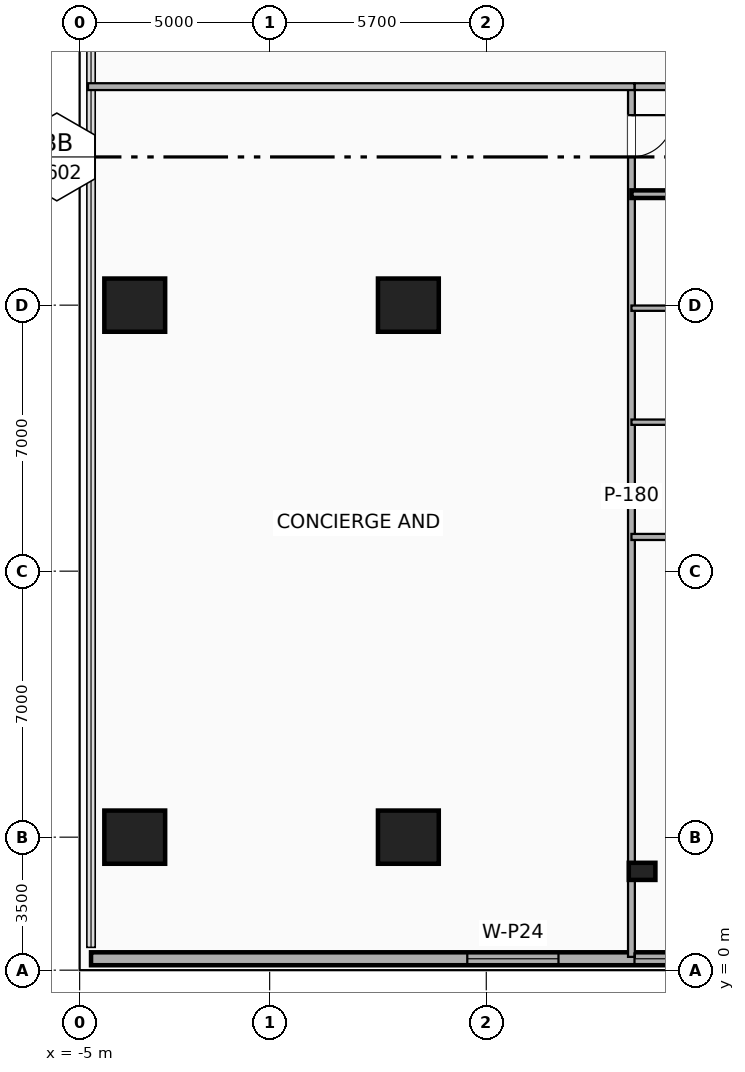
"""IFC4 building model, lengths in metres.
Left out: names, types, materials, properties, quantities, classifications, styles, units other than length and angle.
Written with IfcOpenShell. Run it as: python <this file> out.ifc"""

import sys

from ifc_helpers import new_model, si_unit, direction, frame, frame_2d, origin, origin_2d, place, context, subcontext, project, spatial, rectangle, extrude, element, fill, save


model = new_model("IFC4")
c1 = context("Model", 3, precision=1e-05, world=origin(), true_north=direction((0.0, 1.0)))
c2 = subcontext(c1, "Body", "Model", "MODEL_VIEW")
j1 = project(units=[si_unit("LENGTHUNIT", "METRE"), si_unit("PLANEANGLEUNIT", "RADIAN")], contexts=[c1])
p1 = place(None, origin())
s1 = spatial("IfcSite", under=j1, at=p1, CompositionType="ELEMENT")
p2 = place(p1, origin())
s2 = spatial("IfcBuilding", under=s1, at=p2, CompositionType="ELEMENT")
p3 = place(p2, origin())
s3 = spatial("IfcBuildingStorey", under=s2, at=p3, CompositionType="ELEMENT", Elevation=0.0)
p4 = place(p3, frame((9.8, 2.6, -0.35), z_axis=(0.0, 0.0, 1.0), x_axis=(1.0, 0.0, 0.0)))
e1 = element("IfcColumn", 1, at=p4, inside=s3, PredefinedType="PILASTER", context=c2, shape_type="SweptSolid", body=[
    extrude(rectangle(XDim=0.7, YDim=0.45, at=origin_2d()), origin(), (0.0, 0.0, 1.0), 5.45),
])
for number, where, z_axis, x_axis in (
    (2, (-3.55, 3.5, -0.35), (0.0, 0.0, 1.0), (1.0, 0.0, 0.0)),
    (3, (3.65, 3.5, -0.35), (0.0, 0.0, 1.0), (1.0, 0.0, 0.0)),
    (4, (-3.55, 17.5, -0.35), (0.0, 0.0, 1.0), (1.0, 0.0, 0.0)),
    (5, (3.65, 17.5, -0.35), (0.0, 0.0, 1.0), (1.0, 0.0, 0.0)),
):
    element("IfcColumn", number, at=place(p3, frame(where, z_axis=z_axis, x_axis=x_axis)), inside=s3, PredefinedType="COLUMN", context=c2, shape_type="SweptSolid", body=[
        extrude(rectangle(XDim=1.6, YDim=1.4, at=origin_2d()), origin(), (0.0, 0.0, 1.0), 5.45),
    ])
p5 = place(p3, frame((-4.7, 0.3, 0.0), z_axis=(0.0, 0.0, 1.0), x_axis=(1.0, 0.0, 0.0)))
e6 = element("IfcWall", 6, at=p5, inside=s3, PredefinedType="SOLIDWALL", context=c2, shape_type="SweptSolid", body=[
    extrude(rectangle(XDim=83.4, YDim=0.34, at=frame_2d((41.7, 0.0))), origin(), (0.0, 0.0, 1.0), 5.1),
])
p6 = place(p5, frame((24.78, 0.0, 0.0), z_axis=(0.0, 0.0, 1.0), x_axis=(-1.0, 0.0, 0.0)))
e7 = element("IfcOpeningElement", 7, at=p6, cuts=e6, PredefinedType="OPENING", context=c2, shape_type="SweptSolid", body=[
    extrude(rectangle(XDim=2.0, YDim=2.4, at=frame_2d((1.0, 1.2))), frame((0.0, 0.18, 0.0), z_axis=(0.0, -1.0, 0.0), x_axis=(1.0, 0.0, 0.0)), (0.0, 0.0, 1.0), 0.36),
])
p7 = place(p5, frame((38.85, 0.0, 0.0), z_axis=(0.0, 0.0, 1.0), x_axis=(-1.0, 0.0, 0.0)))
e8 = element("IfcOpeningElement", 8, at=p7, cuts=e6, PredefinedType="OPENING", context=c2, shape_type="SweptSolid", body=[
    extrude(rectangle(XDim=2.0, YDim=2.4, at=frame_2d((1.0, 1.2))), frame((0.0, 0.18, 0.0), z_axis=(0.0, -1.0, 0.0), x_axis=(1.0, 0.0, 0.0)), (0.0, 0.0, 1.0), 0.36),
])
p8 = place(p5, frame((57.35, 0.0, 0.0), z_axis=(0.0, 0.0, 1.0), x_axis=(-1.0, 0.0, 0.0)))
e9 = element("IfcOpeningElement", 9, at=p8, cuts=e6, PredefinedType="OPENING", context=c2, shape_type="SweptSolid", body=[
    extrude(rectangle(XDim=2.0, YDim=2.4, at=frame_2d((1.0, 1.2))), frame((0.0, 0.18, 0.0), z_axis=(0.0, -1.0, 0.0), x_axis=(1.0, 0.0, 0.0)), (0.0, 0.0, 1.0), 0.36),
])
p9 = place(p5, frame((81.0, 0.0, 0.0), z_axis=(0.0, 0.0, 1.0), x_axis=(-1.0, 0.0, 0.0)))
e10 = element("IfcOpeningElement", 10, at=p9, cuts=e6, PredefinedType="OPENING", context=c2, shape_type="SweptSolid", body=[
    extrude(rectangle(XDim=3.8, YDim=3.4, at=frame_2d((1.9, 1.7))), frame((0.0, 0.18, 0.0), z_axis=(0.0, -1.0, 0.0), x_axis=(1.0, 0.0, 0.0)), (0.0, 0.0, 1.0), 0.36),
])
p10 = place(p5, frame((9.9, 0.0, 0.9)))
e11 = element("IfcOpeningElement", 11, at=p10, cuts=e6, PredefinedType="OPENING", context=c2, shape_type="SweptSolid", body=[
    extrude(rectangle(XDim=2.4, YDim=2.6, at=frame_2d((1.2, 1.3))), frame((0.0, 0.18, 0.0), z_axis=(0.0, -1.0, 0.0), x_axis=(1.0, 0.0, 0.0)), (0.0, 0.0, 1.0), 0.36),
])
p11 = place(p5, frame((14.3, 0.0, 0.9)))
e12 = element("IfcOpeningElement", 12, at=p11, cuts=e6, PredefinedType="OPENING", context=c2, shape_type="SweptSolid", body=[
    extrude(rectangle(XDim=2.4, YDim=2.6, at=frame_2d((1.2, 1.3))), frame((0.0, 0.18, 0.0), z_axis=(0.0, -1.0, 0.0), x_axis=(1.0, 0.0, 0.0)), (0.0, 0.0, 1.0), 0.36),
])
p12 = place(p5, frame((27.5, 0.0, 0.9)))
e13 = element("IfcOpeningElement", 13, at=p12, cuts=e6, PredefinedType="OPENING", context=c2, shape_type="SweptSolid", body=[
    extrude(rectangle(XDim=2.4, YDim=2.6, at=frame_2d((1.2, 1.3))), frame((0.0, 0.18, 0.0), z_axis=(0.0, -1.0, 0.0), x_axis=(1.0, 0.0, 0.0)), (0.0, 0.0, 1.0), 0.36),
])
p13 = place(p5, frame((45.9, 0.0, 0.9)))
e14 = element("IfcOpeningElement", 14, at=p13, cuts=e6, PredefinedType="OPENING", context=c2, shape_type="SweptSolid", body=[
    extrude(rectangle(XDim=2.4, YDim=2.6, at=frame_2d((1.2, 1.3))), frame((0.0, 0.18, 0.0), z_axis=(0.0, -1.0, 0.0), x_axis=(1.0, 0.0, 0.0)), (0.0, 0.0, 1.0), 0.36),
])
p14 = place(p5, frame((61.5, 0.0, 0.9)))
e15 = element("IfcOpeningElement", 15, at=p14, cuts=e6, PredefinedType="OPENING", context=c2, shape_type="SweptSolid", body=[
    extrude(rectangle(XDim=2.4, YDim=2.6, at=frame_2d((1.2, 1.3))), frame((0.0, 0.18, 0.0), z_axis=(0.0, -1.0, 0.0), x_axis=(1.0, 0.0, 0.0)), (0.0, 0.0, 1.0), 0.36),
])
p15 = place(p5, frame((68.3, 0.0, 0.9)))
e16 = element("IfcOpeningElement", 16, at=p15, cuts=e6, PredefinedType="OPENING", context=c2, shape_type="SweptSolid", body=[
    extrude(rectangle(XDim=2.4, YDim=2.6, at=frame_2d((1.2, 1.3))), frame((0.0, 0.18, 0.0), z_axis=(0.0, -1.0, 0.0), x_axis=(1.0, 0.0, 0.0)), (0.0, 0.0, 1.0), 0.36),
])
p16 = place(p3, frame((9.52, 0.35, 0.0), z_axis=(0.0, 0.0, 1.0), x_axis=(0.0, 1.0, 0.0)))
e17 = element("IfcWall", 17, at=p16, inside=s3, PredefinedType="PARTITIONING", context=c2, shape_type="SweptSolid", body=[
    extrude(rectangle(XDim=22.9, YDim=0.18, at=frame_2d((11.45, 0.0))), origin(), (0.0, 0.0, 1.0), 5.1),
])
p17 = place(p16, frame((21.05, 0.0, 0.0)))
e18 = element("IfcOpeningElement", 18, at=p17, cuts=e17, PredefinedType="OPENING", context=c2, shape_type="SweptSolid", body=[
    extrude(rectangle(XDim=1.1, YDim=2.15, at=frame_2d((0.55, 1.075))), frame((0.0, 0.1, 0.0), z_axis=(0.0, -1.0, 0.0), x_axis=(1.0, 0.0, 0.0)), (0.0, 0.0, 1.0), 0.2),
])
for number, where, z_axis, x_axis in (
    (19, (9.52, 14.42, 0.0), (0.0, 0.0, 1.0), (1.0, 0.0, 0.0)),
    (20, (9.52, 17.42, 0.0), (0.0, 0.0, 1.0), (1.0, 0.0, 0.0)),
):
    element("IfcWall", number, at=place(p3, frame(where, z_axis=z_axis, x_axis=x_axis)), inside=s3, PredefinedType="PARTITIONING", context=c2, shape_type="SweptSolid", body=[
        extrude(rectangle(XDim=4.5, YDim=0.14, at=frame_2d((2.25, 0.0))), origin(), (0.0, 0.0, 1.0), 4.23),
    ])
p18 = place(p3, frame((9.52, 11.4, 0.0), z_axis=(0.0, 0.0, 1.0), x_axis=(1.0, 0.0, 0.0)))
e21 = element("IfcWall", 21, at=p18, inside=s3, PredefinedType="PARTITIONING", context=c2, shape_type="SweptSolid", body=[
    extrude(rectangle(XDim=4.5, YDim=0.16, at=frame_2d((2.25, 0.0))), origin(), (0.0, 0.0, 1.0), 4.23),
])
p19 = place(p3, frame((9.52, 20.42, 0.0), z_axis=(0.0, 0.0, 1.0), x_axis=(1.0, 0.0, 0.0)))
e22 = element("IfcWall", 22, at=p19, inside=s3, PredefinedType="PARTITIONING", context=c2, shape_type="SweptSolid", body=[
    extrude(rectangle(XDim=4.5, YDim=0.2, at=frame_2d((2.25, 0.0))), origin(), (0.0, 0.0, 1.0), 4.164),
])
p20 = place(p3, frame((9.6, 23.25, 0.0), z_axis=(0.0, 0.0, 1.0), x_axis=(1.0, 0.0, 0.0)))
e23 = element("IfcWall", 23, at=p20, inside=s3, PredefinedType="PARTITIONING", context=c2, shape_type="SweptSolid", body=[
    extrude(rectangle(XDim=10.7, YDim=0.18, at=frame_2d((5.35, 0.0))), origin(), (0.0, 0.0, 1.0), 4.23),
])
p21 = place(p20, frame((4.55, 0.0, 0.0)))
e24 = element("IfcOpeningElement", 24, at=p21, cuts=e23, PredefinedType="OPENING", context=c2, shape_type="SweptSolid", body=[
    extrude(rectangle(XDim=1.6, YDim=2.22, at=frame_2d((0.8, 1.11))), frame((0.0, 0.1, 0.0), z_axis=(0.0, -1.0, 0.0), x_axis=(1.0, 0.0, 0.0)), (0.0, 0.0, 1.0), 0.2),
])
p22 = place(p3, frame((-4.78, 23.25, 0.0), z_axis=(0.0, 0.0, 1.0), x_axis=(1.0, 0.0, 0.0)))
e25 = element("IfcWall", 25, at=p22, inside=s3, PredefinedType="PARTITIONING", context=c2, shape_type="SweptSolid", body=[
    extrude(rectangle(XDim=14.38, YDim=0.18, at=frame_2d((7.19, 0.0))), origin(), (0.0, 0.0, 1.0), 4.23),
])
p23 = place(p10, origin())
e26 = element("IfcWindow", 26, at=p23, inside=s3, PartitioningType="SINGLE_PANEL", PredefinedType="WINDOW", context=c2, shape_type="SweptSolid", body=[
    extrude(rectangle(XDim=2.4, YDim=2.6, at=frame_2d((1.2, 1.3))), frame((0.0, 0.03, 0.0), z_axis=(0.0, -1.0, 0.0), x_axis=(1.0, 0.0, 0.0)), (0.0, 0.0, 1.0), 0.06),
])
fill(e11, e26)
p24 = place(p11, origin())
e27 = element("IfcWindow", 27, at=p24, inside=s3, PartitioningType="SINGLE_PANEL", PredefinedType="WINDOW", context=c2, shape_type="SweptSolid", body=[
    extrude(rectangle(XDim=2.4, YDim=2.6, at=frame_2d((1.2, 1.3))), frame((0.0, 0.03, 0.0), z_axis=(0.0, -1.0, 0.0), x_axis=(1.0, 0.0, 0.0)), (0.0, 0.0, 1.0), 0.06),
])
fill(e12, e27)
p25 = place(p17, origin())
e28 = element("IfcDoor", 28, at=p25, inside=s3, OperationType="SINGLE_SWING_RIGHT", PredefinedType="DOOR", context=c2, shape_type="SweptSolid", body=[
    extrude(rectangle(XDim=1.1, YDim=2.15, at=frame_2d((0.55, 1.075))), frame((0.0, 0.025, 0.0), z_axis=(0.0, -1.0, 0.0), x_axis=(1.0, 0.0, 0.0)), (0.0, 0.0, 1.0), 0.05),
])
fill(e18, e28)
save(model, sys.argv[1])
